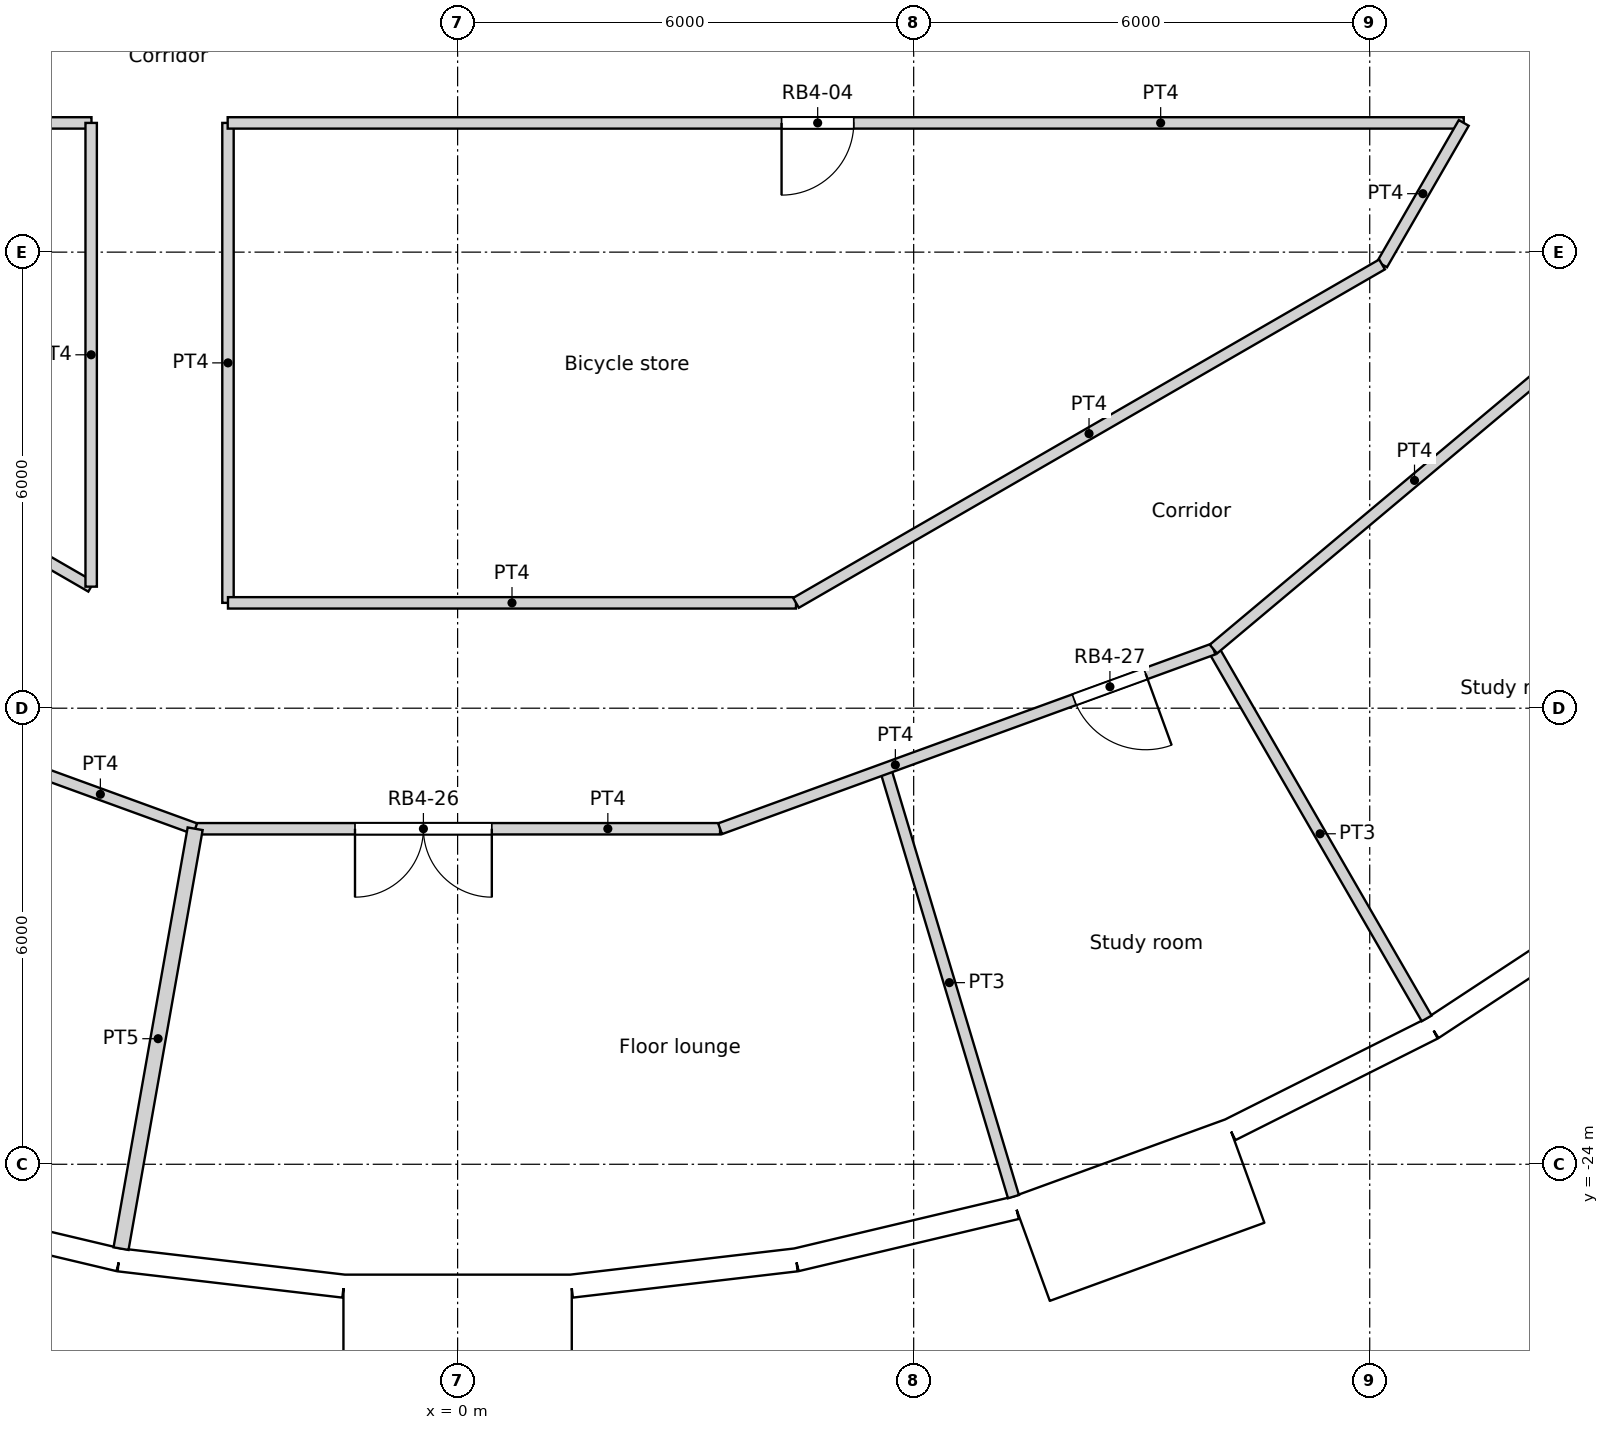
"""IFC4 building model, lengths in metres.
Left out: names, types, materials, properties, quantities, classifications, styles, units other than length and angle.
Written with IfcOpenShell. Run it as: python <this file> out.ifc"""

import sys

from ifc_helpers import new_model, si_unit, direction, frame, frame_2d, origin, origin_2d, place, context, subcontext, project, spatial, rectangle, circle, extrude, element, fill, save


model = new_model("IFC4")
c1 = context("Model", 3, precision=1e-05, world=origin(), true_north=direction((0.0, 1.0)))
c2 = subcontext(c1, "Body", "Model", "MODEL_VIEW")
j1 = project(units=[si_unit("LENGTHUNIT", "METRE"), si_unit("PLANEANGLEUNIT", "RADIAN")], contexts=[c1])
p1 = place(None, origin())
s1 = spatial("IfcSite", under=j1, at=p1, CompositionType="ELEMENT")
p2 = place(p1, origin())
s2 = spatial("IfcBuilding", under=s1, at=p2, CompositionType="ELEMENT")
p3 = place(p2, frame((0.0, 0.0, 158.4)))
s3 = spatial("IfcBuildingStorey", under=s2, at=p3, CompositionType="ELEMENT", Elevation=158.4)
for number, where, z_axis, x_axis in (
    (1, (-1.427, -24.506, 0.0), (0.0, 0.0, 1.0), (1.0, 0.0, 0.0)),
    (2, (4.263, -24.175, 0.0), (0.0, 0.0, 1.0), (1.0, 0.0, 0.0)),
    (3, (9.723, -22.54, 0.0), (0.0, 0.0, 1.0), (1.0, 0.0, 0.0)),
    (4, (14.659, -19.69, 0.0), (0.0, 0.0, 1.0), (1.0, 0.0, 0.0)),
):
    element("IfcColumn", number, at=place(p3, frame(where, z_axis=z_axis, x_axis=x_axis)), inside=s3, PredefinedType="COLUMN", context=c2, shape_type="SweptSolid", body=[
        extrude(circle(Radius=0.6, at=origin_2d()), origin(), (0.0, 0.0, 1.0), 3.6),
    ])
for number, where, z_axis, x_axis in (
    (5, (-4.188, -18.35, 0.0), (0.0, 0.0, 1.0), (1.0, 0.0, 0.0)),
    (6, (1.406, -18.77, 0.0), (0.0, 0.0, 1.0), (1.0, 0.0, 0.0)),
    (7, (6.876, -17.521, 0.0), (0.0, 0.0, 1.0), (1.0, 0.0, 0.0)),
    (8, (11.735, -14.716, 0.0), (0.0, 0.0, 1.0), (1.0, 0.0, 0.0)),
):
    element("IfcColumn", number, at=place(p3, frame(where, z_axis=z_axis, x_axis=x_axis)), inside=s3, PredefinedType="COLUMN", context=c2, shape_type="SweptSolid", body=[
        extrude(circle(Radius=0.65, at=origin_2d()), origin(), (0.0, 0.0, 1.0), 3.6),
    ])
p4 = place(p3, frame((-7.346, -24.572, 0.0), z_axis=(0.0, 0.0, 1.0), x_axis=(0.973049746156, -0.230595298102, 0.0)))
e9 = element("IfcWall", 9, at=p4, inside=s3, PredefinedType="SOLIDWALL", context=c2, shape_type="SweptSolid", body=[
    extrude(rectangle(XDim=2.973, YDim=0.3, at=frame_2d((1.486, 0.0))), origin(), (0.0, 0.0, 1.0), 3.3),
])
p5 = place(p4, frame((1.486, 0.0, 1.55)))
e10 = element("IfcOpeningElement", 10, at=p5, cuts=e9, PredefinedType="OPENING", context=c2, shape_type="SweptSolid", body=[
    extrude(circle(Radius=0.9, at=origin_2d()), frame((0.0, 0.16, 0.0), z_axis=(0.0, -1.0, 0.0), x_axis=(1.0, 0.0, 0.0)), (0.0, 0.0, 1.0), 0.32),
])
p6 = place(p3, frame((-4.454, -25.258, 0.0), z_axis=(0.0, 0.0, 1.0), x_axis=(0.993235542767, -0.116116995244, 0.0)))
e11 = element("IfcWall", 11, at=p6, inside=s3, PredefinedType="SOLIDWALL", context=c2, shape_type="SweptSolid", body=[
    extrude(rectangle(XDim=2.973, YDim=0.3, at=frame_2d((1.486, 0.0))), origin(), (0.0, 0.0, 1.0), 3.3),
])
p7 = place(p6, frame((1.486, 0.0, 1.55)))
e12 = element("IfcOpeningElement", 12, at=p7, cuts=e11, PredefinedType="OPENING", context=c2, shape_type="SweptSolid", body=[
    extrude(circle(Radius=0.9, at=origin_2d()), frame((0.0, 0.16, 0.0), z_axis=(0.0, -1.0, 0.0), x_axis=(1.0, 0.0, 0.0)), (0.0, 0.0, 1.0), 0.32),
])
p8 = place(p3, frame((-1.5, -26.179, -0.3), z_axis=(0.0, 0.0, 1.0), x_axis=(1.0, 0.0, 0.0)))
e13 = element("IfcWall", 13, at=p8, inside=s3, PredefinedType="ELEMENTEDWALL", context=c2, shape_type="SweptSolid", body=[
    extrude(rectangle(XDim=3.0, YDim=1.45, at=frame_2d((1.5, 0.0))), origin(), (0.0, 0.0, 1.0), 3.6),
])
p9 = place(p8, frame((1.5, 0.0, 1.85)))
e14 = element("IfcOpeningElement", 14, at=p9, cuts=e13, PredefinedType="OPENING", context=c2, shape_type="SweptSolid", body=[
    extrude(circle(Radius=0.9, at=origin_2d()), frame((0.0, 0.735, 0.0), z_axis=(0.0, -1.0, 0.0), x_axis=(1.0, 0.0, 0.0)), (0.0, 0.0, 1.0), 1.47),
])
p10 = place(p3, frame((1.501, -25.603, 0.0), z_axis=(0.0, 0.0, 1.0), x_axis=(0.993235542767, 0.116116995244, 0.0)))
e15 = element("IfcWall", 15, at=p10, inside=s3, PredefinedType="SOLIDWALL", context=c2, shape_type="SweptSolid", body=[
    extrude(rectangle(XDim=2.973, YDim=0.3, at=frame_2d((1.486, 0.0))), origin(), (0.0, 0.0, 1.0), 3.3),
])
p11 = place(p10, frame((1.486, 0.0, 1.55)))
e16 = element("IfcOpeningElement", 16, at=p11, cuts=e15, PredefinedType="OPENING", context=c2, shape_type="SweptSolid", body=[
    extrude(circle(Radius=0.9, at=origin_2d()), frame((0.0, 0.16, 0.0), z_axis=(0.0, -1.0, 0.0), x_axis=(1.0, 0.0, 0.0)), (0.0, 0.0, 1.0), 0.32),
])
p12 = place(p3, frame((4.454, -25.258, 0.0), z_axis=(0.0, 0.0, 1.0), x_axis=(0.973049746156, 0.230595298102, 0.0)))
e17 = element("IfcWall", 17, at=p12, inside=s3, PredefinedType="SOLIDWALL", context=c2, shape_type="SweptSolid", body=[
    extrude(rectangle(XDim=2.973, YDim=0.3, at=frame_2d((1.486, 0.0))), origin(), (0.0, 0.0, 1.0), 3.3),
])
p13 = place(p12, frame((1.486, 0.0, 1.55)))
e18 = element("IfcOpeningElement", 18, at=p13, cuts=e17, PredefinedType="OPENING", context=c2, shape_type="SweptSolid", body=[
    extrude(circle(Radius=0.9, at=origin_2d()), frame((0.0, 0.16, 0.0), z_axis=(0.0, -1.0, 0.0), x_axis=(1.0, 0.0, 0.0)), (0.0, 0.0, 1.0), 0.32),
])
p14 = place(p3, frame((7.544, -25.113, -0.3), z_axis=(0.0, 0.0, 1.0), x_axis=(0.939686455819, 0.342037080957, 0.0)))
e19 = element("IfcWall", 19, at=p14, inside=s3, PredefinedType="ELEMENTEDWALL", context=c2, shape_type="SweptSolid", body=[
    extrude(rectangle(XDim=3.0, YDim=1.45, at=frame_2d((1.5, 0.0))), origin(), (0.0, 0.0, 1.0), 3.6),
])
p15 = place(p14, frame((1.5, 0.0, 1.85)))
e20 = element("IfcOpeningElement", 20, at=p15, cuts=e19, PredefinedType="OPENING", context=c2, shape_type="SweptSolid", body=[
    extrude(circle(Radius=0.9, at=origin_2d()), frame((0.0, 0.735, 0.0), z_axis=(0.0, -1.0, 0.0), x_axis=(1.0, 0.0, 0.0)), (0.0, 0.0, 1.0), 1.47),
])
p16 = place(p3, frame((10.167, -23.546, 0.0), z_axis=(0.0, 0.0, 1.0), x_axis=(0.893637442555, 0.448789618045, 0.0)))
e21 = element("IfcWall", 21, at=p16, inside=s3, PredefinedType="SOLIDWALL", context=c2, shape_type="SweptSolid", body=[
    extrude(rectangle(XDim=2.973, YDim=0.3, at=frame_2d((1.486, 0.0))), origin(), (0.0, 0.0, 1.0), 3.3),
])
p17 = place(p16, frame((1.486, 0.0, 1.55)))
e22 = element("IfcOpeningElement", 22, at=p17, cuts=e21, PredefinedType="OPENING", context=c2, shape_type="SweptSolid", body=[
    extrude(circle(Radius=0.9, at=origin_2d()), frame((0.0, 0.16, 0.0), z_axis=(0.0, -1.0, 0.0), x_axis=(1.0, 0.0, 0.0)), (0.0, 0.0, 1.0), 0.32),
])
p18 = place(p3, frame((12.824, -22.211, 0.0), z_axis=(0.0, 0.0, 1.0), x_axis=(0.835470659512, 0.549535055382, 0.0)))
e23 = element("IfcWall", 23, at=p18, inside=s3, PredefinedType="SOLIDWALL", context=c2, shape_type="SweptSolid", body=[
    extrude(rectangle(XDim=2.973, YDim=0.3, at=frame_2d((1.487, 0.0))), origin(), (0.0, 0.0, 1.0), 3.3),
])
p19 = place(p18, frame((1.486, 0.0, 1.55)))
e24 = element("IfcOpeningElement", 24, at=p19, cuts=e23, PredefinedType="OPENING", context=c2, shape_type="SweptSolid", body=[
    extrude(circle(Radius=0.9, at=origin_2d()), frame((0.0, 0.16, 0.0), z_axis=(0.0, -1.0, 0.0), x_axis=(1.0, 0.0, 0.0)), (0.0, 0.0, 1.0), 0.32),
])
p20 = place(p3, frame((-12.504, -10.3, 0.0), z_axis=(0.0, 0.0, 1.0), x_axis=(1.0, 0.0, 0.0)))
e25 = element("IfcWall", 25, at=p20, inside=s3, PredefinedType="PARTITIONING", context=c2, shape_type="SweptSolid", body=[
    extrude(rectangle(XDim=7.687, YDim=0.15, at=frame_2d((3.844, 0.0))), origin(), (0.0, 0.0, 1.0), 3.3),
])
p21 = place(p3, frame((-3.025, -10.3, 0.0), z_axis=(0.0, 0.0, 1.0), x_axis=(1.0, 0.0, 0.0)))
e26 = element("IfcWall", 26, at=p21, inside=s3, PredefinedType="PARTITIONING", context=c2, shape_type="SweptSolid", body=[
    extrude(rectangle(XDim=16.262, YDim=0.15, at=frame_2d((8.131, 0.0))), origin(), (0.0, 0.0, 1.0), 3.3),
])
p22 = place(p21, frame((7.287, 0.0, 0.0)))
e27 = element("IfcOpeningElement", 27, at=p22, cuts=e26, PredefinedType="OPENING", context=c2, shape_type="SweptSolid", body=[
    extrude(rectangle(XDim=0.95, YDim=2.1, at=frame_2d((0.475, 1.05))), frame((0.0, 0.075, 0.0), z_axis=(0.0, -1.0, 0.0), x_axis=(1.0, 0.0, 0.0)), (0.0, 0.0, 1.0), 0.15),
])
p23 = place(p3, frame((12.162, -12.162, 0.0), z_axis=(0.0, 0.0, 1.0), x_axis=(0.499961633463, 0.866047553582, 0.0)))
e28 = element("IfcWall", 28, at=p23, inside=s3, PredefinedType="PARTITIONING", context=c2, shape_type="SweptSolid", body=[
    extrude(rectangle(XDim=2.15, YDim=0.15, at=frame_2d((1.075, 0.0))), origin(), (0.0, 0.0, 1.0), 3.3),
])
p24 = place(p3, frame((9.943, -17.222, 0.0), z_axis=(0.0, 0.0, 1.0), x_axis=(0.766192104565, 0.642611592567, 0.0)))
e29 = element("IfcWall", 29, at=p24, inside=s3, PredefinedType="PARTITIONING", context=c2, shape_type="SweptSolid", body=[
    extrude(rectangle(XDim=6.906, YDim=0.15, at=frame_2d((3.453, 0.0))), origin(), (0.0, 0.0, 1.0), 3.3),
])
p25 = place(p3, frame((-12.162, -12.162, 0.0), z_axis=(0.0, 0.0, 1.0), x_axis=(0.866004766557, -0.500035743023, 0.0)))
e30 = element("IfcWall", 30, at=p25, inside=s3, PredefinedType="PARTITIONING", context=c2, shape_type="SweptSolid", body=[
    extrude(rectangle(XDim=8.477, YDim=0.15, at=frame_2d((4.239, 0.0))), origin(), (0.0, 0.0, 1.0), 3.3),
])
p26 = place(p25, frame((3.738, 0.0, 0.0)))
e31 = element("IfcOpeningElement", 31, at=p26, cuts=e30, PredefinedType="OPENING", context=c2, shape_type="SweptSolid", body=[
    extrude(rectangle(XDim=1.0, YDim=2.04, at=frame_2d((0.5, 1.02))), frame((0.0, 0.075, 0.0), z_axis=(0.0, -1.0, 0.0), x_axis=(1.0, 0.0, 0.0)), (0.0, 0.0, 1.0), 0.15),
])
p27 = place(p3, frame((-4.821, -16.401, 0.0), z_axis=(0.0, 0.0, 1.0), x_axis=(0.0, 1.0, 0.0)))
e32 = element("IfcWall", 32, at=p27, inside=s3, PredefinedType="PARTITIONING", context=c2, shape_type="SweptSolid", body=[
    extrude(rectangle(XDim=6.101, YDim=0.15, at=frame_2d((3.05, 0.0))), origin(), (0.0, 0.0, 1.0), 3.3),
])
p28 = place(p3, frame((-3.021, -16.614, 0.0), z_axis=(0.0, 0.0, 1.0), x_axis=(0.0, 1.0, 0.0)))
e33 = element("IfcWall", 33, at=p28, inside=s3, PredefinedType="PARTITIONING", context=c2, shape_type="SweptSolid", body=[
    extrude(rectangle(XDim=6.314, YDim=0.15, at=frame_2d((3.157, 0.0))), origin(), (0.0, 0.0, 1.0), 3.3),
])
p29 = place(p3, frame((-3.021, -16.614, 0.0), z_axis=(0.0, 0.0, 1.0), x_axis=(1.0, 0.0, 0.0)))
e34 = element("IfcWall", 34, at=p29, inside=s3, PredefinedType="PARTITIONING", context=c2, shape_type="SweptSolid", body=[
    extrude(rectangle(XDim=7.473, YDim=0.15, at=frame_2d((3.736, 0.0))), origin(), (0.0, 0.0, 1.0), 3.3),
])
p30 = place(p3, frame((4.452, -16.614, 0.0), z_axis=(0.0, 0.0, 1.0), x_axis=(0.866005203721, 0.500034985904, 0.0)))
e35 = element("IfcWall", 35, at=p30, inside=s3, PredefinedType="PARTITIONING", context=c2, shape_type="SweptSolid", body=[
    extrude(rectangle(XDim=8.903, YDim=0.15, at=frame_2d((4.452, 0.0))), origin(), (0.0, 0.0, 1.0), 3.3),
])
p31 = place(p3, frame((-9.944, -17.223, 0.0), z_axis=(0.0, 0.0, 1.0), x_axis=(0.939672634566, -0.342075050021, 0.0)))
e36 = element("IfcWall", 36, at=p31, inside=s3, PredefinedType="PARTITIONING", context=c2, shape_type="SweptSolid", body=[
    extrude(rectangle(XDim=6.908, YDim=0.15, at=frame_2d((3.454, 0.0))), origin(), (0.0, 0.0, 1.0), 3.3),
])
p32 = place(p31, frame((2.704, 0.0, 0.0)))
e37 = element("IfcOpeningElement", 37, at=p32, cuts=e36, PredefinedType="OPENING", context=c2, shape_type="SweptSolid", body=[
    extrude(rectangle(XDim=1.5, YDim=2.1, at=frame_2d((0.75, 1.05))), frame((0.0, 0.075, 0.0), z_axis=(0.0, -1.0, 0.0), x_axis=(1.0, 0.0, 0.0)), (0.0, 0.0, 1.0), 0.15),
])
p33 = place(p3, frame((3.453, -19.586, 0.0), z_axis=(0.0, 0.0, 1.0), x_axis=(0.939607544688, 0.342253797591, 0.0)))
e38 = element("IfcWall", 38, at=p33, inside=s3, PredefinedType="PARTITIONING", context=c2, shape_type="SweptSolid", body=[
    extrude(rectangle(XDim=6.908, YDim=0.15, at=frame_2d((3.454, 0.0))), origin(), (0.0, 0.0, 1.0), 3.3),
])
p34 = place(p33, frame((4.959, 0.0, 0.0)))
e39 = element("IfcOpeningElement", 39, at=p34, cuts=e38, PredefinedType="OPENING", context=c2, shape_type="SweptSolid", body=[
    extrude(rectangle(XDim=1.0, YDim=2.04, at=frame_2d((0.5, 1.02))), frame((0.0, 0.075, 0.0), z_axis=(0.0, -1.0, 0.0), x_axis=(1.0, 0.0, 0.0)), (0.0, 0.0, 1.0), 0.15),
])
p35 = place(p3, frame((-3.453, -19.586, 0.0), z_axis=(0.0, 0.0, 1.0), x_axis=(1.0, 0.0, 0.0)))
e40 = element("IfcWall", 40, at=p35, inside=s3, PredefinedType="PARTITIONING", context=c2, shape_type="SweptSolid", body=[
    extrude(rectangle(XDim=6.906, YDim=0.15, at=frame_2d((3.453, 0.0))), origin(), (0.0, 0.0, 1.0), 3.3),
])
p36 = place(p35, frame((2.103, 0.0, 0.0)))
e41 = element("IfcOpeningElement", 41, at=p36, cuts=e40, PredefinedType="OPENING", context=c2, shape_type="SweptSolid", body=[
    extrude(rectangle(XDim=1.8, YDim=2.1, at=frame_2d((0.9, 1.05))), frame((0.0, 0.075, 0.0), z_axis=(0.0, -1.0, 0.0), x_axis=(1.0, 0.0, 0.0)), (0.0, 0.0, 1.0), 0.15),
])
p37 = place(p3, frame((-4.428, -25.11, 0.0), z_axis=(0.0, 0.0, 1.0), x_axis=(0.17382754149, 0.984776109489, 0.0)))
e42 = element("IfcWall", 42, at=p37, inside=s3, PredefinedType="PARTITIONING", context=c2, shape_type="SweptSolid", body=[
    extrude(rectangle(XDim=5.61, YDim=0.2, at=frame_2d((2.805, 0.0))), origin(), (0.0, 0.0, 1.0), 3.3),
])
p38 = place(p3, frame((5.627, -18.795, 0.0), z_axis=(0.0, 0.0, 1.0), x_axis=(0.286833432865, -0.957980470464, 0.0)))
e43 = element("IfcWall", 43, at=p38, inside=s3, PredefinedType="PARTITIONING", context=c2, shape_type="SweptSolid", body=[
    extrude(rectangle(XDim=5.878, YDim=0.15, at=frame_2d((2.939, 0.0))), origin(), (0.0, 0.0, 1.0), 3.3),
])
p39 = place(p3, frame((9.944, -17.223, 0.0), z_axis=(0.0, 0.0, 1.0), x_axis=(0.500010020406, -0.866019618423, 0.0)))
e44 = element("IfcWall", 44, at=p39, inside=s3, PredefinedType="PARTITIONING", context=c2, shape_type="SweptSolid", body=[
    extrude(rectangle(XDim=5.61, YDim=0.15, at=frame_2d((2.805, 0.0))), origin(), (0.0, 0.0, 1.0), 3.3),
])
p40 = place(p5, origin())
e45 = element("IfcWindow", 45, at=p40, inside=s3, PartitioningType="SINGLE_PANEL", PredefinedType="WINDOW", context=c2, shape_type="SweptSolid", body=[
    extrude(circle(Radius=0.9, at=origin_2d()), frame((0.0, 0.12, 0.0), z_axis=(0.0, -1.0, 0.0), x_axis=(1.0, 0.0, 0.0)), (0.0, 0.0, 1.0), 0.1),
])
fill(e10, e45)
p41 = place(p7, origin())
e46 = element("IfcWindow", 46, at=p41, inside=s3, PartitioningType="SINGLE_PANEL", PredefinedType="WINDOW", context=c2, shape_type="SweptSolid", body=[
    extrude(circle(Radius=0.9, at=origin_2d()), frame((0.0, 0.12, 0.0), z_axis=(0.0, -1.0, 0.0), x_axis=(1.0, 0.0, 0.0)), (0.0, 0.0, 1.0), 0.1),
])
fill(e12, e46)
p42 = place(p9, origin())
e47 = element("IfcWindow", 47, at=p42, inside=s3, PartitioningType="SINGLE_PANEL", PredefinedType="WINDOW", context=c2, shape_type="SweptSolid", body=[
    extrude(circle(Radius=0.9, at=origin_2d()), frame((0.0, 0.695, 0.0), z_axis=(0.0, -1.0, 0.0), x_axis=(1.0, 0.0, 0.0)), (0.0, 0.0, 1.0), 0.1),
])
fill(e14, e47)
p43 = place(p11, origin())
e48 = element("IfcWindow", 48, at=p43, inside=s3, PartitioningType="SINGLE_PANEL", PredefinedType="WINDOW", context=c2, shape_type="SweptSolid", body=[
    extrude(circle(Radius=0.9, at=origin_2d()), frame((0.0, 0.12, 0.0), z_axis=(0.0, -1.0, 0.0), x_axis=(1.0, 0.0, 0.0)), (0.0, 0.0, 1.0), 0.1),
])
fill(e16, e48)
p44 = place(p13, origin())
e49 = element("IfcWindow", 49, at=p44, inside=s3, PartitioningType="SINGLE_PANEL", PredefinedType="WINDOW", context=c2, shape_type="SweptSolid", body=[
    extrude(circle(Radius=0.9, at=origin_2d()), frame((0.0, 0.12, 0.0), z_axis=(0.0, -1.0, 0.0), x_axis=(1.0, 0.0, 0.0)), (0.0, 0.0, 1.0), 0.1),
])
fill(e18, e49)
p45 = place(p15, origin())
e50 = element("IfcWindow", 50, at=p45, inside=s3, PartitioningType="SINGLE_PANEL", PredefinedType="WINDOW", context=c2, shape_type="SweptSolid", body=[
    extrude(circle(Radius=0.9, at=origin_2d()), frame((0.0, 0.695, 0.0), z_axis=(0.0, -1.0, 0.0), x_axis=(1.0, 0.0, 0.0)), (0.0, 0.0, 1.0), 0.1),
])
fill(e20, e50)
p46 = place(p17, origin())
e51 = element("IfcWindow", 51, at=p46, inside=s3, PartitioningType="SINGLE_PANEL", PredefinedType="WINDOW", context=c2, shape_type="SweptSolid", body=[
    extrude(circle(Radius=0.9, at=origin_2d()), frame((0.0, 0.12, 0.0), z_axis=(0.0, -1.0, 0.0), x_axis=(1.0, 0.0, 0.0)), (0.0, 0.0, 1.0), 0.1),
])
fill(e22, e51)
p47 = place(p19, origin())
e52 = element("IfcWindow", 52, at=p47, inside=s3, PartitioningType="SINGLE_PANEL", PredefinedType="WINDOW", context=c2, shape_type="SweptSolid", body=[
    extrude(circle(Radius=0.9, at=origin_2d()), frame((0.0, 0.12, 0.0), z_axis=(0.0, -1.0, 0.0), x_axis=(1.0, 0.0, 0.0)), (0.0, 0.0, 1.0), 0.1),
])
fill(e24, e52)
p48 = place(p22, origin())
e53 = element("IfcDoor", 53, at=p48, inside=s3, OperationType="SINGLE_SWING_RIGHT", PredefinedType="DOOR", context=c2, shape_type="SweptSolid", body=[
    extrude(rectangle(XDim=0.95, YDim=2.1, at=frame_2d((0.475, 1.05))), frame((0.0, 0.025, 0.0), z_axis=(0.0, -1.0, 0.0), x_axis=(1.0, 0.0, 0.0)), (0.0, 0.0, 1.0), 0.05),
])
fill(e27, e53)
p49 = place(p36, origin())
e54 = element("IfcDoor", 54, at=p49, inside=s3, OperationType="DOUBLE_DOOR_SINGLE_SWING", PredefinedType="DOOR", context=c2, shape_type="SweptSolid", body=[
    extrude(rectangle(XDim=1.8, YDim=2.1, at=frame_2d((0.9, 1.05))), frame((0.0, 0.025, 0.0), z_axis=(0.0, -1.0, 0.0), x_axis=(1.0, 0.0, 0.0)), (0.0, 0.0, 1.0), 0.05),
])
fill(e41, e54)
p50 = place(p34, origin())
e55 = element("IfcDoor", 55, at=p50, inside=s3, OperationType="SINGLE_SWING_LEFT", PredefinedType="DOOR", context=c2, shape_type="SweptSolid", body=[
    extrude(rectangle(XDim=1.0, YDim=2.04, at=frame_2d((0.5, 1.02))), frame((0.0, 0.025, 0.0), z_axis=(0.0, -1.0, 0.0), x_axis=(1.0, 0.0, 0.0)), (0.0, 0.0, 1.0), 0.05),
])
fill(e39, e55)
save(model, sys.argv[1])
